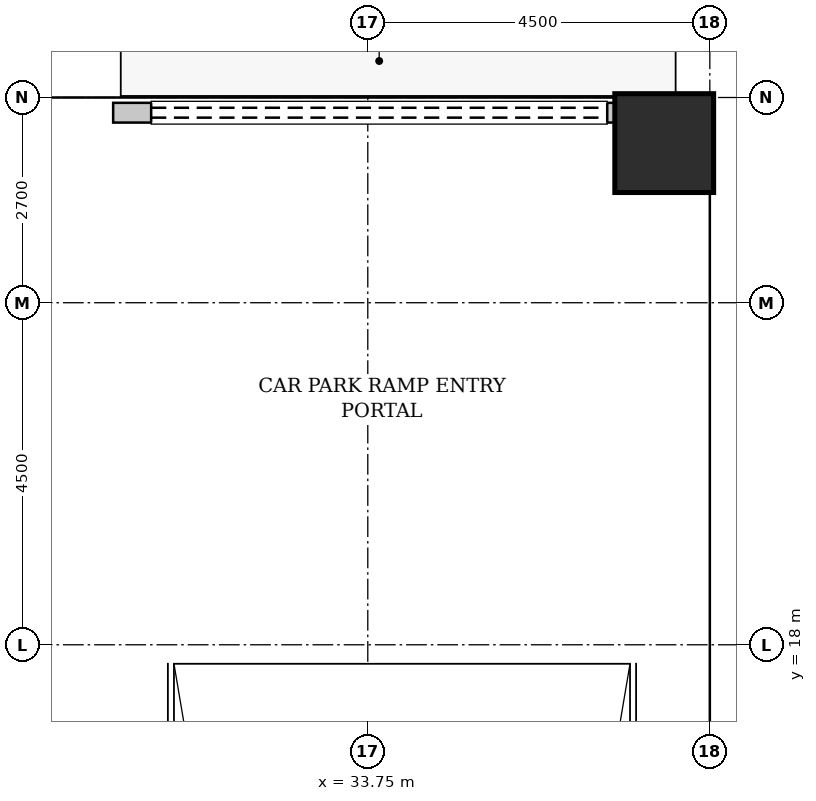
"""IFC4 building model, lengths in metres.
Left out: names, types, materials, properties, quantities, classifications, styles, units other than length and angle.
Written with IfcOpenShell. Run it as: python <this file> out.ifc"""

import sys

from ifc_helpers import new_model, si_unit, direction, frame, frame_2d, origin, origin_2d, place, context, subcontext, project, spatial, rectangle, hollow_rectangle, extrude, source, transform, mapped, element, fill, save


model = new_model("IFC4")
c1 = context("Model", 3, precision=1e-05, world=origin(), true_north=direction((0.0, 1.0)))
c2 = subcontext(c1, "Body", "Model", "MODEL_VIEW")
j1 = project(units=[si_unit("LENGTHUNIT", "METRE"), si_unit("PLANEANGLEUNIT", "RADIAN")], contexts=[c1])
p1 = place(None, origin())
s1 = spatial("IfcSite", under=j1, at=p1, CompositionType="ELEMENT")
p2 = place(p1, origin())
s2 = spatial("IfcBuilding", under=s1, at=p2, CompositionType="ELEMENT")
p3 = place(p2, origin())
s3 = spatial("IfcBuildingStorey", under=s2, at=p3, CompositionType="ELEMENT", Elevation=0.0)
m1 = source(origin(), c2, "Body", "SweptSolid", [
    extrude(hollow_rectangle(XDim=1.3, YDim=1.3, WallThickness=0.065, InnerFilletRadius=0.065, OuterFilletRadius=0.13, at=origin_2d()), origin(), (0.0, 0.0, 1.0), 6.0),
])
p4 = place(p3, frame((37.65, 24.6, 0.0), z_axis=(0.0, 0.0, 1.0), x_axis=(1.0, 0.0, 0.0)))
e1 = element("IfcColumn", 1, at=p4, inside=s3, PredefinedType="COLUMN", context=c2, shape_type="MappedRepresentation", body=[
    mapped(m1, transform((0.0, 0.0, 0.0), x_axis=(1.0, 0.0, 0.0), y_axis=(0.0, 1.0, 0.0), z_axis=(0.0, 0.0, 1.0), scale=1.0)),
])
m2 = source(origin(), c2, "Body", "SweptSolid", [
    extrude(rectangle(XDim=7.0, YDim=0.26, at=frame_2d((3.5, 0.0))), origin(), (0.0, 0.0, 1.0), 5.7),
])
p5 = place(p3, frame((30.4, 25.0, 0.0), z_axis=(0.0, 0.0, 1.0), x_axis=(1.0, 0.0, 0.0)))
e2 = element("IfcWall", 2, at=p5, inside=s3, PredefinedType="SOLIDWALL", context=c2, shape_type="MappedRepresentation", body=[
    mapped(m2, transform((0.0, 0.0, 0.0), x_axis=(1.0, 0.0, 0.0), y_axis=(0.0, 1.0, 0.0), z_axis=(0.0, 0.0, 1.0), scale=1.0)),
])
p6 = place(p5, frame((0.5, 0.0, 0.0)))
e3 = element("IfcOpeningElement", 3, at=p6, cuts=e2, PredefinedType="OPENING", context=c2, shape_type="SweptSolid", body=[
    extrude(rectangle(XDim=6.0, YDim=3.2, at=frame_2d((3.0, 1.6))), frame((0.0, 0.14, 0.0), z_axis=(0.0, -1.0, 0.0), x_axis=(1.0, 0.0, 0.0)), (0.0, 0.0, 1.0), 0.28),
])
m3 = source(origin(), c2, "Body", "SweptSolid", [
    extrude(rectangle(XDim=6.0, YDim=3.2, at=frame_2d((3.0, 1.6))), frame((0.0, 0.025, 0.0), z_axis=(0.0, -1.0, 0.0), x_axis=(1.0, 0.0, 0.0)), (0.0, 0.0, 1.0), 0.05),
])
p7 = place(p6, origin())
e4 = element("IfcDoor", 4, at=p7, inside=s3, OperationType="ROLLINGUP", PredefinedType="GATE", context=c2, shape_type="MappedRepresentation", body=[
    mapped(m3, transform((0.0, 0.0, 0.0), x_axis=(1.0, 0.0, 0.0), y_axis=(0.0, 1.0, 0.0), z_axis=(0.0, 0.0, 1.0), scale=1.0)),
])
fill(e3, e4)
save(model, sys.argv[1])
